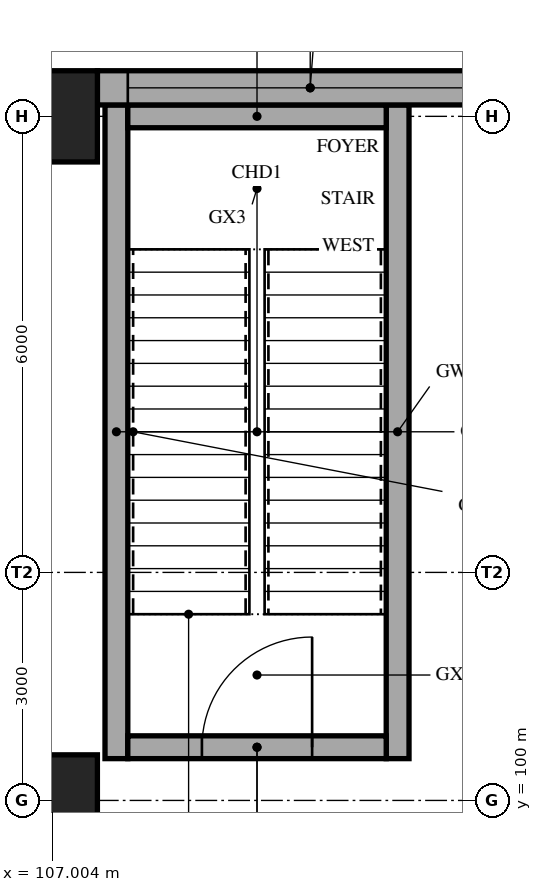
"""IFC4 building model, lengths in metres.
Left out: names, types, materials, properties, quantities, classifications, styles, units other than length and angle.
Written with IfcOpenShell. Run it as: python <this file> out.ifc"""

import sys

from ifc_helpers import new_model, si_unit, direction, frame, frame_2d, origin, origin_2d, place, context, subcontext, project, spatial, rectangle, extrude, element, fill, save


model = new_model("IFC4")
c1 = context("Model", 3, precision=1e-05, world=origin(), true_north=direction((0.0, 1.0)))
c2 = subcontext(c1, "Body", "Model", "MODEL_VIEW")
j1 = project(units=[si_unit("LENGTHUNIT", "METRE"), si_unit("PLANEANGLEUNIT", "RADIAN")], contexts=[c1])
p1 = place(None, origin())
s1 = spatial("IfcSite", under=j1, at=p1, CompositionType="ELEMENT")
p2 = place(p1, origin())
s2 = spatial("IfcBuilding", under=s1, at=p2, CompositionType="ELEMENT")
p3 = place(p2, origin())
s3 = spatial("IfcBuildingStorey", under=s2, at=p3, CompositionType="ELEMENT", Elevation=0.0)
for number, where, z_axis, x_axis in (
    (1, (106.8, 100.0, 0.0), (0.0, 0.0, 1.0), (1.0, 0.0, 0.0)),
    (2, (106.8, 109.0, 0.0), (0.0, 0.0, 1.0), (1.0, 0.0, 0.0)),
):
    element("IfcColumn", number, at=place(p3, frame(where, z_axis=z_axis, x_axis=x_axis)), inside=s3, PredefinedType="COLUMN", context=c2, shape_type="SweptSolid", body=[
        extrude(rectangle(XDim=1.6, YDim=1.2, at=origin_2d()), origin(), (0.0, 0.0, 1.0), 5.0),
    ])
for number, where, z_axis, x_axis in (
    (3, (107.85, 100.55, 0.0), (0.0, 0.0, 1.0), (0.0, 1.0, 0.0)),
    (4, (111.55, 100.55, 0.0), (0.0, 0.0, 1.0), (0.0, 1.0, 0.0)),
):
    element("IfcWall", number, at=place(p3, frame(where, z_axis=z_axis, x_axis=x_axis)), inside=s3, PredefinedType="SHEAR", context=c2, shape_type="SweptSolid", body=[
        extrude(rectangle(XDim=8.6, YDim=0.3, at=frame_2d((4.3, 0.0))), origin(), (0.0, 0.0, 1.0), 5.0),
    ])
p4 = place(p3, frame((108.0, 100.7, 0.0), z_axis=(0.0, 0.0, 1.0), x_axis=(1.0, 0.0, 0.0)))
e5 = element("IfcWall", 5, at=p4, inside=s3, PredefinedType="SHEAR", context=c2, shape_type="SweptSolid", body=[
    extrude(rectangle(XDim=3.4, YDim=0.3, at=frame_2d((1.7, 0.0))), origin(), (0.0, 0.0, 1.0), 5.0),
])
p5 = place(p4, frame((0.975, 0.0, 0.0)))
e6 = element("IfcOpeningElement", 6, at=p5, cuts=e5, PredefinedType="OPENING", context=c2, shape_type="SweptSolid", body=[
    extrude(rectangle(XDim=1.45, YDim=2.1, at=frame_2d((0.725, 1.05))), frame((0.0, 0.16, 0.0), z_axis=(0.0, -1.0, 0.0), x_axis=(1.0, 0.0, 0.0)), (0.0, 0.0, 1.0), 0.32),
])
p6 = place(p3, frame((108.0, 109.0, 0.0), z_axis=(0.0, 0.0, 1.0), x_axis=(1.0, 0.0, 0.0)))
e7 = element("IfcWall", 7, at=p6, inside=s3, PredefinedType="SHEAR", context=c2, shape_type="SweptSolid", body=[
    extrude(rectangle(XDim=3.4, YDim=0.3, at=frame_2d((1.7, 0.0))), origin(), (0.0, 0.0, 1.0), 5.0),
])
p7 = place(p3, frame((107.6, 109.375, 0.0), z_axis=(0.0, 0.0, 1.0), x_axis=(1.0, 0.0, 0.0)))
e8 = element("IfcWall", 8, at=p7, inside=s3, PredefinedType="SOLIDWALL", context=c2, shape_type="SweptSolid", body=[
    extrude(rectangle(XDim=5.6, YDim=0.45, at=frame_2d((2.8, 0.0))), origin(), (0.0, 0.0, 1.0), 5.0),
])
p8 = place(p7, frame((0.4, 0.0, 0.9)))
e9 = element("IfcOpeningElement", 9, at=p8, cuts=e8, PredefinedType="OPENING", context=c2, shape_type="SweptSolid", body=[
    extrude(rectangle(XDim=4.8, YDim=3.0, at=frame_2d((2.4, 1.5))), frame((0.0, 0.235, 0.0), z_axis=(0.0, -1.0, 0.0), x_axis=(1.0, 0.0, 0.0)), (0.0, 0.0, 1.0), 0.47),
])
p9 = place(p8, origin())
e10 = element("IfcWindow", 10, at=p9, inside=s3, PartitioningType="SINGLE_PANEL", PredefinedType="WINDOW", context=c2, shape_type="SweptSolid", body=[
    extrude(rectangle(XDim=4.8, YDim=3.0, at=frame_2d((2.4, 1.5))), frame((0.0, 0.03, 0.0), z_axis=(0.0, -1.0, 0.0), x_axis=(1.0, 0.0, 0.0)), (0.0, 0.0, 1.0), 0.06),
])
fill(e9, e10)
p10 = place(p5, origin())
e11 = element("IfcDoor", 11, at=p10, inside=s3, OperationType="SINGLE_SWING_RIGHT", PredefinedType="DOOR", context=c2, shape_type="SweptSolid", body=[
    extrude(rectangle(XDim=1.45, YDim=2.1, at=frame_2d((0.725, 1.05))), frame((0.0, 0.025, 0.0), z_axis=(0.0, -1.0, 0.0), x_axis=(1.0, 0.0, 0.0)), (0.0, 0.0, 1.0), 0.05),
])
fill(e6, e11)
save(model, sys.argv[1])
